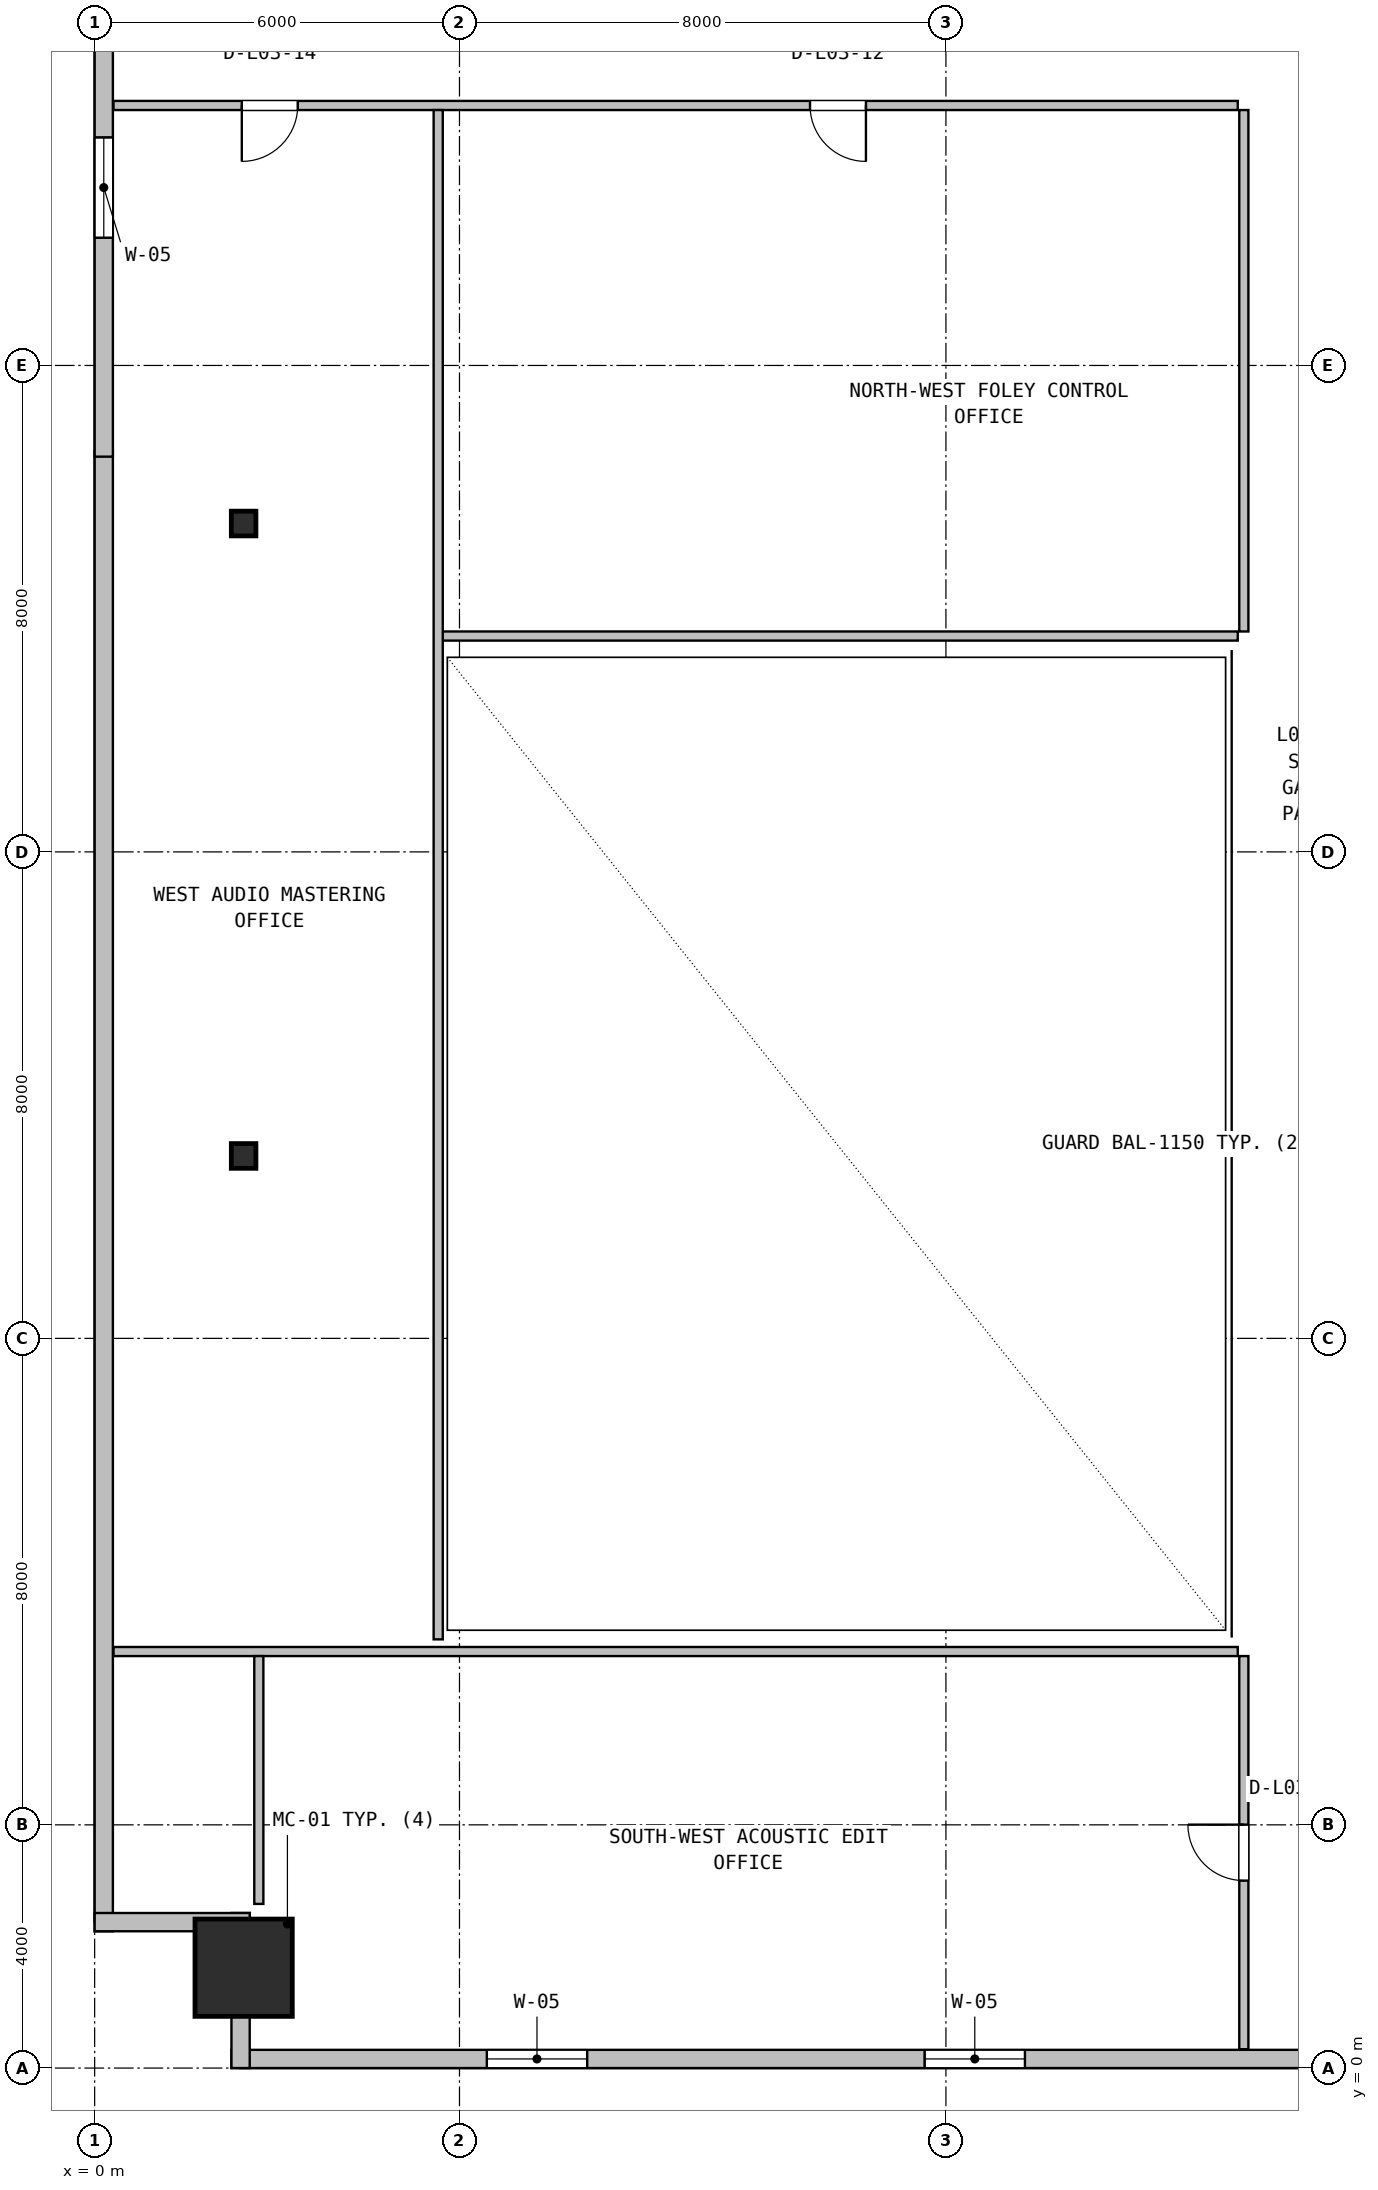
"""IFC4 building model, lengths in metres.
Left out: names, types, materials, properties, quantities, classifications, styles, units other than length and angle.
Written with IfcOpenShell. Run it as: python <this file> out.ifc"""

import sys

from ifc_helpers import new_model, si_unit, direction, frame, frame_2d, origin, origin_2d, place, context, subcontext, project, spatial, rectangle, hollow_rectangle, i_section, extrude, source, transform, mapped, element, fill, save


model = new_model("IFC4")
c1 = context("Model", 3, precision=1e-05, world=origin(), true_north=direction((0.0, 1.0)))
c2 = subcontext(c1, "Body", "Model", "MODEL_VIEW")
j1 = project(units=[si_unit("LENGTHUNIT", "METRE"), si_unit("PLANEANGLEUNIT", "RADIAN")], contexts=[c1])
p1 = place(None, origin())
s1 = spatial("IfcSite", under=j1, at=p1, CompositionType="ELEMENT")
p2 = place(p1, origin())
s2 = spatial("IfcBuilding", under=s1, at=p2, CompositionType="ELEMENT")
p3 = place(p2, frame((0.0, 0.0, 16.8)))
s3 = spatial("IfcBuildingStorey", under=s2, at=p3, CompositionType="ELEMENT", Elevation=16.8)
m1 = source(origin(), c2, "Body", "SweptSolid", [
    extrude(hollow_rectangle(XDim=1.6, YDim=1.6, WallThickness=0.06, at=origin_2d()), origin(), (0.0, 0.0, 1.0), 5.4),
])
p4 = place(p3, frame((2.45, 1.65, 0.0), z_axis=(0.0, 0.0, 1.0), x_axis=(1.0, 0.0, 0.0)))
e1 = element("IfcColumn", 1, at=p4, inside=s3, PredefinedType="COLUMN", context=c2, shape_type="MappedRepresentation", body=[
    mapped(m1, transform((0.0, 0.0, 0.0), x_axis=(1.0, 0.0, 0.0), y_axis=(0.0, 1.0, 0.0), z_axis=(0.0, 0.0, 1.0), scale=1.0)),
])
m2 = source(origin(), c2, "Body", "SweptSolid", [
    extrude(i_section(OverallWidth=0.404, OverallDepth=0.407, WebThickness=0.027, FlangeThickness=0.044, FilletRadius=0.018, at=origin_2d()), origin(), (0.0, 0.0, 1.0), 5.4),
])
for number, where, z_axis, x_axis in (
    (2, (2.45, 15.0, 0.0), (0.0, 0.0, 1.0), (1.0, 0.0, 0.0)),
    (3, (2.45, 25.4, 0.0), (0.0, 0.0, 1.0), (1.0, 0.0, 0.0)),
):
    element("IfcColumn", number, at=place(p3, frame(where, z_axis=z_axis, x_axis=x_axis)), inside=s3, PredefinedType="COLUMN", context=c2, shape_type="MappedRepresentation", body=[
        mapped(m2, transform((0.0, 0.0, 0.0), x_axis=(1.0, 0.0, 0.0), y_axis=(0.0, 1.0, 0.0), z_axis=(0.0, 0.0, 1.0), scale=1.0)),
    ])
p5 = place(p3, frame((2.25, 0.15, 0.0), z_axis=(0.0, 0.0, 1.0), x_axis=(1.0, 0.0, 0.0)))
e4 = element("IfcWall", 4, at=p5, inside=s3, PredefinedType="SOLIDWALL", context=c2, shape_type="SweptSolid", body=[
    extrude(rectangle(XDim=19.25, YDim=0.3, at=frame_2d((9.625, 0.0))), origin(), (0.0, 0.0, 1.0), 5.06),
])
p6 = place(p5, frame((4.2, 0.0, 0.9)))
e5 = element("IfcOpeningElement", 5, at=p6, cuts=e4, PredefinedType="OPENING", context=c2, shape_type="SweptSolid", body=[
    extrude(rectangle(XDim=1.65, YDim=1.8, at=frame_2d((0.825, 0.9))), frame((0.0, 0.16, 0.0), z_axis=(0.0, -1.0, 0.0), x_axis=(1.0, 0.0, 0.0)), (0.0, 0.0, 1.0), 0.32),
])
p7 = place(p5, frame((11.4, 0.0, 0.9)))
e6 = element("IfcOpeningElement", 6, at=p7, cuts=e4, PredefinedType="OPENING", context=c2, shape_type="SweptSolid", body=[
    extrude(rectangle(XDim=1.65, YDim=1.8, at=frame_2d((0.825, 0.9))), frame((0.0, 0.16, 0.0), z_axis=(0.0, -1.0, 0.0), x_axis=(1.0, 0.0, 0.0)), (0.0, 0.0, 1.0), 0.32),
])
p8 = place(p3, frame((0.15, 2.25, 0.0), z_axis=(0.0, 0.0, 1.0), x_axis=(0.0, 1.0, 0.0)))
e7 = element("IfcWall", 7, at=p8, inside=s3, PredefinedType="SOLIDWALL", context=c2, shape_type="SweptSolid", body=[
    extrude(rectangle(XDim=24.35, YDim=0.3, at=frame_2d((12.175, 0.0))), origin(), (0.0, 0.0, 1.0), 5.06),
])
p9 = place(p3, frame((0.15, 26.5, 0.0), z_axis=(0.0, 0.0, 1.0), x_axis=(0.0, 1.0, 0.0)))
e8 = element("IfcWall", 8, at=p9, inside=s3, PredefinedType="SOLIDWALL", context=c2, shape_type="SweptSolid", body=[
    extrude(rectangle(XDim=19.25, YDim=0.3, at=frame_2d((9.625, 0.0))), origin(), (0.0, 0.0, 1.0), 5.06),
])
p10 = place(p9, frame((3.6, 0.0, 0.9)))
e9 = element("IfcOpeningElement", 9, at=p10, cuts=e8, PredefinedType="OPENING", context=c2, shape_type="SweptSolid", body=[
    extrude(rectangle(XDim=1.65, YDim=1.8, at=frame_2d((0.825, 0.9))), frame((0.0, 0.16, 0.0), z_axis=(0.0, -1.0, 0.0), x_axis=(1.0, 0.0, 0.0)), (0.0, 0.0, 1.0), 0.32),
])
p11 = place(p9, frame((12.8, 0.0, 0.9)))
e10 = element("IfcOpeningElement", 10, at=p11, cuts=e8, PredefinedType="OPENING", context=c2, shape_type="SweptSolid", body=[
    extrude(rectangle(XDim=1.65, YDim=1.8, at=frame_2d((0.825, 0.9))), frame((0.0, 0.16, 0.0), z_axis=(0.0, -1.0, 0.0), x_axis=(1.0, 0.0, 0.0)), (0.0, 0.0, 1.0), 0.32),
])
for number, where, z_axis, x_axis in (
    (11, (2.4, 0.0, 0.0), (0.0, 0.0, 1.0), (0.0, 1.0, 0.0)),
    (12, (0.0, 2.4, 0.0), (0.0, 0.0, 1.0), (1.0, 0.0, 0.0)),
):
    element("IfcWall", number, at=place(p3, frame(where, z_axis=z_axis, x_axis=x_axis)), inside=s3, PredefinedType="SOLIDWALL", context=c2, shape_type="SweptSolid", body=[
        extrude(rectangle(XDim=2.55, YDim=0.3, at=frame_2d((1.275, 0.0))), origin(), (0.0, 0.0, 1.0), 4.143),
    ])
p12 = place(p3, frame((18.9, 0.31, 0.0), z_axis=(0.0, 0.0, 1.0), x_axis=(0.0, 1.0, 0.0)))
e13 = element("IfcWall", 13, at=p12, inside=s3, PredefinedType="PARTITIONING", context=c2, shape_type="SweptSolid", body=[
    extrude(rectangle(XDim=6.465, YDim=0.15, at=frame_2d((3.232, 0.0))), origin(), (0.0, 0.0, 1.0), 4.143),
])
p13 = place(p12, frame((2.773, 0.0, 0.0)))
e14 = element("IfcOpeningElement", 14, at=p13, cuts=e13, PredefinedType="OPENING", context=c2, shape_type="SweptSolid", body=[
    extrude(rectangle(XDim=0.92, YDim=2.08, at=frame_2d((0.46, 1.04))), frame((0.0, 0.085, 0.0), z_axis=(0.0, -1.0, 0.0), x_axis=(1.0, 0.0, 0.0)), (0.0, 0.0, 1.0), 0.17),
])
p14 = place(p3, frame((0.31, 6.85, 0.0), z_axis=(0.0, 0.0, 1.0), x_axis=(1.0, 0.0, 0.0)))
e15 = element("IfcWall", 15, at=p14, inside=s3, PredefinedType="PARTITIONING", context=c2, shape_type="SweptSolid", body=[
    extrude(rectangle(XDim=18.49, YDim=0.15, at=frame_2d((9.245, 0.0))), origin(), (0.0, 0.0, 1.0), 4.143),
])
p15 = place(p3, frame((2.7, 2.7, 0.0), z_axis=(0.0, 0.0, 1.0), x_axis=(0.0, 1.0, 0.0)))
e16 = element("IfcWall", 16, at=p15, inside=s3, PredefinedType="PARTITIONING", context=c2, shape_type="SweptSolid", body=[
    extrude(rectangle(XDim=4.075, YDim=0.15, at=frame_2d((2.038, 0.0))), origin(), (0.0, 0.0, 1.0), 4.143),
])
p16 = place(p3, frame((5.65, 23.55, 0.0), z_axis=(0.0, 0.0, 1.0), x_axis=(1.0, 0.0, 0.0)))
e17 = element("IfcWall", 17, at=p16, inside=s3, PredefinedType="PARTITIONING", context=c2, shape_type="SweptSolid", body=[
    extrude(rectangle(XDim=13.15, YDim=0.15, at=frame_2d((6.575, 0.0))), origin(), (0.0, 0.0, 1.0), 5.06),
])
p17 = place(p3, frame((18.9, 23.625, 0.0), z_axis=(0.0, 0.0, 1.0), x_axis=(0.0, 1.0, 0.0)))
e18 = element("IfcWall", 18, at=p17, inside=s3, PredefinedType="PARTITIONING", context=c2, shape_type="SweptSolid", body=[
    extrude(rectangle(XDim=8.575, YDim=0.15, at=frame_2d((4.288, 0.0))), origin(), (0.0, 0.0, 1.0), 4.143),
])
p18 = place(p3, frame((0.31, 32.275, 0.0), z_axis=(0.0, 0.0, 1.0), x_axis=(1.0, 0.0, 0.0)))
e19 = element("IfcWall", 19, at=p18, inside=s3, PredefinedType="PARTITIONING", context=c2, shape_type="SweptSolid", body=[
    extrude(rectangle(XDim=18.49, YDim=0.15, at=frame_2d((9.245, 0.0))), origin(), (0.0, 0.0, 1.0), 4.143),
])
p19 = place(p18, frame((11.455, 0.0, 0.0)))
e20 = element("IfcOpeningElement", 20, at=p19, cuts=e19, PredefinedType="OPENING", context=c2, shape_type="SweptSolid", body=[
    extrude(rectangle(XDim=0.92, YDim=2.08, at=frame_2d((0.46, 1.04))), frame((0.0, 0.085, 0.0), z_axis=(0.0, -1.0, 0.0), x_axis=(1.0, 0.0, 0.0)), (0.0, 0.0, 1.0), 0.17),
])
p20 = place(p18, frame((2.11, 0.0, 0.0)))
e21 = element("IfcOpeningElement", 21, at=p20, cuts=e19, PredefinedType="OPENING", context=c2, shape_type="SweptSolid", body=[
    extrude(rectangle(XDim=0.92, YDim=2.08, at=frame_2d((0.46, 1.04))), frame((0.0, 0.085, 0.0), z_axis=(0.0, -1.0, 0.0), x_axis=(1.0, 0.0, 0.0)), (0.0, 0.0, 1.0), 0.17),
])
p21 = place(p3, frame((5.65, 7.05, 0.0), z_axis=(0.0, 0.0, 1.0), x_axis=(0.0, 1.0, 0.0)))
e22 = element("IfcWall", 22, at=p21, inside=s3, PredefinedType="PARTITIONING", context=c2, shape_type="SweptSolid", body=[
    extrude(rectangle(XDim=25.15, YDim=0.15, at=frame_2d((12.575, 0.0))), origin(), (0.0, 0.0, 1.0), 4.143),
])
m3 = source(origin(), c2, "Body", "SweptSolid", [
    extrude(rectangle(XDim=1.65, YDim=1.8, at=frame_2d((0.825, 0.9))), frame((0.0, 0.03, 0.0), z_axis=(0.0, -1.0, 0.0), x_axis=(1.0, 0.0, 0.0)), (0.0, 0.0, 1.0), 0.06),
])
p22 = place(p6, origin())
e23 = element("IfcWindow", 23, at=p22, inside=s3, PartitioningType="SINGLE_PANEL", PredefinedType="WINDOW", context=c2, shape_type="MappedRepresentation", body=[
    mapped(m3, transform((0.0, 0.0, 0.0), x_axis=(1.0, 0.0, 0.0), y_axis=(0.0, 1.0, 0.0), z_axis=(0.0, 0.0, 1.0), scale=1.0)),
])
fill(e5, e23)
p23 = place(p7, origin())
e24 = element("IfcWindow", 24, at=p23, inside=s3, PartitioningType="SINGLE_PANEL", PredefinedType="WINDOW", context=c2, shape_type="MappedRepresentation", body=[
    mapped(m3, transform((0.0, 0.0, 0.0), x_axis=(1.0, 0.0, 0.0), y_axis=(0.0, 1.0, 0.0), z_axis=(0.0, 0.0, 1.0), scale=1.0)),
])
fill(e6, e24)
p24 = place(p10, origin())
e25 = element("IfcWindow", 25, at=p24, inside=s3, PartitioningType="SINGLE_PANEL", PredefinedType="WINDOW", context=c2, shape_type="MappedRepresentation", body=[
    mapped(m3, transform((0.0, 0.0, 0.0), x_axis=(1.0, 0.0, 0.0), y_axis=(0.0, 1.0, 0.0), z_axis=(0.0, 0.0, 1.0), scale=1.0)),
])
fill(e9, e25)
m4 = source(origin(), c2, "Body", "SweptSolid", [
    extrude(rectangle(XDim=0.92, YDim=2.08, at=frame_2d((0.46, 1.04))), frame((0.0, 0.025, 0.0), z_axis=(0.0, -1.0, 0.0), x_axis=(1.0, 0.0, 0.0)), (0.0, 0.0, 1.0), 0.05),
])
p25 = place(p13, origin())
e26 = element("IfcDoor", 26, at=p25, inside=s3, OperationType="SINGLE_SWING_RIGHT", PredefinedType="DOOR", context=c2, shape_type="MappedRepresentation", body=[
    mapped(m4, transform((0.0, 0.0, 0.0), x_axis=(1.0, 0.0, 0.0), y_axis=(0.0, 1.0, 0.0), z_axis=(0.0, 0.0, 1.0), scale=1.0)),
])
fill(e14, e26)
p26 = place(p19, frame((0.92, 0.0, 0.0), z_axis=(0.0, 0.0, 1.0), x_axis=(-1.0, 0.0, 0.0)))
e27 = element("IfcDoor", 27, at=p26, inside=s3, OperationType="SINGLE_SWING_RIGHT", PredefinedType="DOOR", context=c2, shape_type="MappedRepresentation", body=[
    mapped(m4, transform((0.0, 0.0, 0.0), x_axis=(1.0, 0.0, 0.0), y_axis=(0.0, 1.0, 0.0), z_axis=(0.0, 0.0, 1.0), scale=1.0)),
])
fill(e20, e27)
p27 = place(p20, frame((0.92, 0.0, 0.0), z_axis=(0.0, 0.0, 1.0), x_axis=(-1.0, 0.0, 0.0)))
e28 = element("IfcDoor", 28, at=p27, inside=s3, OperationType="SINGLE_SWING_LEFT", PredefinedType="DOOR", context=c2, shape_type="MappedRepresentation", body=[
    mapped(m4, transform((0.0, 0.0, 0.0), x_axis=(1.0, 0.0, 0.0), y_axis=(0.0, 1.0, 0.0), z_axis=(0.0, 0.0, 1.0), scale=1.0)),
])
fill(e21, e28)
save(model, sys.argv[1])
